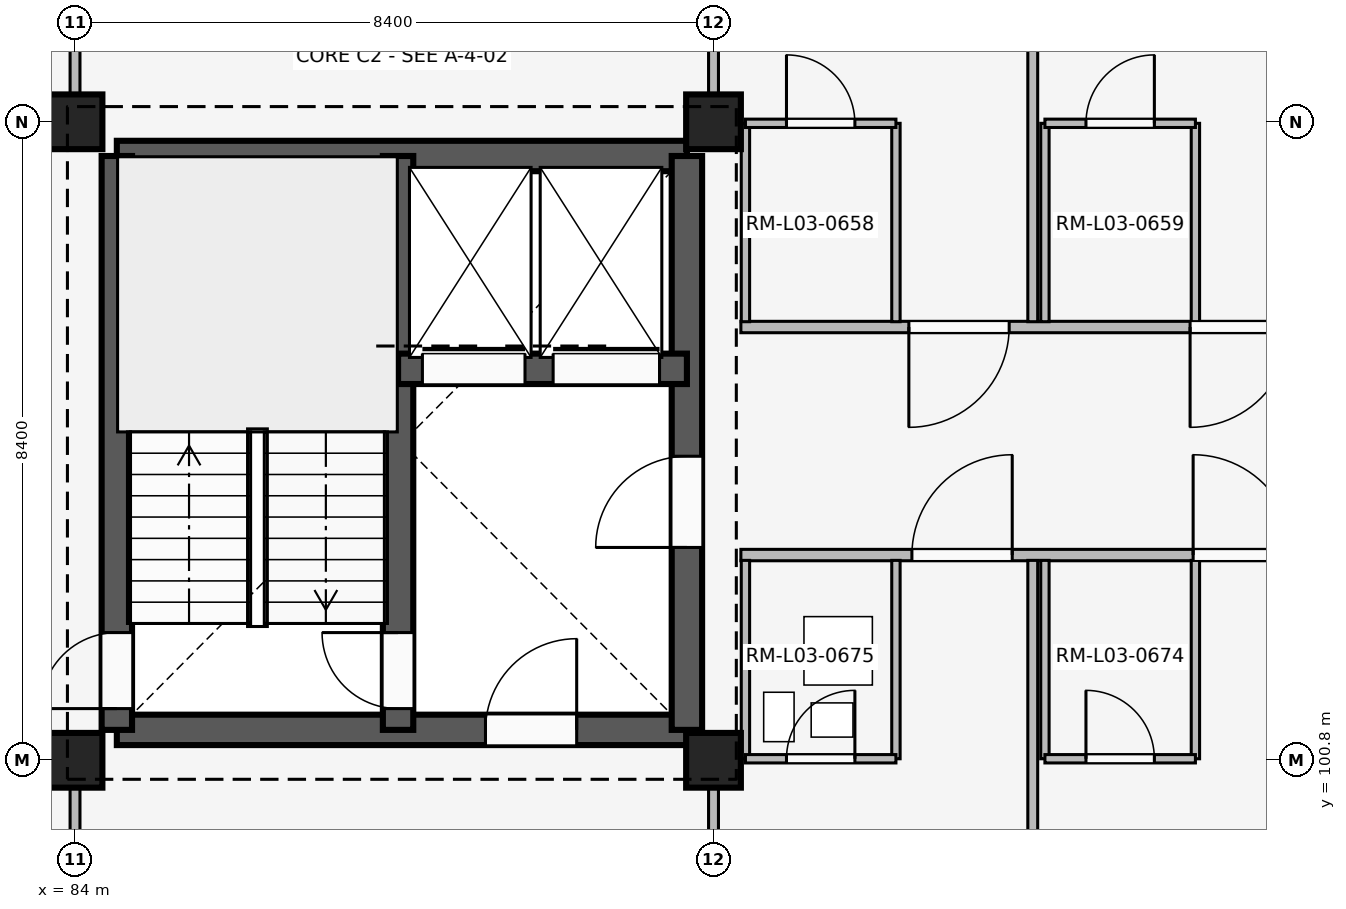
"""IFC4 building model, lengths in metres.
Left out: names, types, materials, properties, quantities, classifications, styles, units other than length and angle.
Written with IfcOpenShell. Run it as: python <this file> out.ifc"""

import sys

from ifc_helpers import new_model, si_unit, direction, frame, frame_2d, origin, origin_2d, place, context, subcontext, project, spatial, rectangle, extrude, element, fill, save


model = new_model("IFC4")
c1 = context("Model", 3, precision=1e-05, world=origin(), true_north=direction((0.0, 1.0)))
c2 = subcontext(c1, "Body", "Model", "MODEL_VIEW")
j1 = project(units=[si_unit("LENGTHUNIT", "METRE"), si_unit("PLANEANGLEUNIT", "RADIAN")], contexts=[c1])
p1 = place(None, origin())
s1 = spatial("IfcSite", under=j1, at=p1, CompositionType="ELEMENT")
p2 = place(p1, origin())
s2 = spatial("IfcBuilding", under=s1, at=p2, CompositionType="ELEMENT")
p3 = place(p2, frame((0.0, 0.0, 12.9)))
s3 = spatial("IfcBuildingStorey", under=s2, at=p3, CompositionType="ELEMENT", Elevation=12.9)
for number, where, z_axis, x_axis in (
    (1, (84.0, 100.8, 0.0), (0.0, 0.0, 1.0), (1.0, 0.0, 0.0)),
    (2, (84.0, 109.2, 0.0), (0.0, 0.0, 1.0), (1.0, 0.0, 0.0)),
    (3, (92.4, 100.8, 0.0), (0.0, 0.0, 1.0), (1.0, 0.0, 0.0)),
    (4, (92.4, 109.2, 0.0), (0.0, 0.0, 1.0), (1.0, 0.0, 0.0)),
):
    element("IfcColumn", number, at=place(p3, frame(where, z_axis=z_axis, x_axis=x_axis)), inside=s3, PredefinedType="COLUMN", context=c2, shape_type="SweptSolid", body=[
        extrude(rectangle(XDim=0.72, YDim=0.72, at=origin_2d()), origin(), (0.0, 0.0, 1.0), 3.3),
    ])
p4 = place(p3, frame((84.55, 101.2, 0.0), z_axis=(0.0, 0.0, 1.0), x_axis=(1.0, 0.0, 0.0)))
e5 = element("IfcWall", 5, at=p4, inside=s3, PredefinedType="SHEAR", context=c2, shape_type="SweptSolid", body=[
    extrude(rectangle(XDim=7.5, YDim=0.4, at=frame_2d((3.75, 0.0))), origin(), (0.0, 0.0, 1.0), 3.02),
])
p5 = place(p4, frame((4.85, 0.0, 0.0)))
e6 = element("IfcOpeningElement", 6, at=p5, cuts=e5, PredefinedType="OPENING", context=c2, shape_type="SweptSolid", body=[
    extrude(rectangle(XDim=1.2, YDim=2.2, at=frame_2d((0.6, 1.1))), frame((0.0, 0.21, 0.0), z_axis=(0.0, -1.0, 0.0), x_axis=(1.0, 0.0, 0.0)), (0.0, 0.0, 1.0), 0.42),
])
p6 = place(p3, frame((84.55, 108.75, 0.0), z_axis=(0.0, 0.0, 1.0), x_axis=(1.0, 0.0, 0.0)))
e7 = element("IfcWall", 7, at=p6, inside=s3, PredefinedType="SHEAR", context=c2, shape_type="SweptSolid", body=[
    extrude(rectangle(XDim=7.5, YDim=0.4, at=frame_2d((3.75, 0.0))), origin(), (0.0, 0.0, 1.0), 3.02),
])
p7 = place(p3, frame((84.55, 101.2, 0.0), z_axis=(0.0, 0.0, 1.0), x_axis=(0.0, 1.0, 0.0)))
e8 = element("IfcWall", 8, at=p7, inside=s3, PredefinedType="SHEAR", context=c2, shape_type="SweptSolid", body=[
    extrude(rectangle(XDim=7.55, YDim=0.4, at=frame_2d((3.775, 0.0))), origin(), (0.0, 0.0, 1.0), 3.02),
])
p8 = place(p7, frame((0.28, 0.0, 0.0)))
e9 = element("IfcOpeningElement", 9, at=p8, cuts=e8, PredefinedType="OPENING", context=c2, shape_type="SweptSolid", body=[
    extrude(rectangle(XDim=1.0, YDim=2.15, at=frame_2d((0.5, 1.075))), frame((0.0, 0.21, 0.0), z_axis=(0.0, -1.0, 0.0), x_axis=(1.0, 0.0, 0.0)), (0.0, 0.0, 1.0), 0.42),
])
p9 = place(p3, frame((92.05, 101.2, 0.0), z_axis=(0.0, 0.0, 1.0), x_axis=(0.0, 1.0, 0.0)))
e10 = element("IfcWall", 10, at=p9, inside=s3, PredefinedType="SHEAR", context=c2, shape_type="SweptSolid", body=[
    extrude(rectangle(XDim=7.55, YDim=0.4, at=frame_2d((3.775, 0.0))), origin(), (0.0, 0.0, 1.0), 3.02),
])
p10 = place(p9, frame((2.4, 0.0, 0.0)))
e11 = element("IfcOpeningElement", 11, at=p10, cuts=e10, PredefinedType="OPENING", context=c2, shape_type="SweptSolid", body=[
    extrude(rectangle(XDim=1.2, YDim=2.2, at=frame_2d((0.6, 1.1))), frame((0.0, 0.21, 0.0), z_axis=(0.0, -1.0, 0.0), x_axis=(1.0, 0.0, 0.0)), (0.0, 0.0, 1.0), 0.42),
])
p11 = place(p3, frame((88.25, 101.2, 0.0), z_axis=(0.0, 0.0, 1.0), x_axis=(0.0, 1.0, 0.0)))
e12 = element("IfcWall", 12, at=p11, inside=s3, PredefinedType="SHEAR", context=c2, shape_type="SweptSolid", body=[
    extrude(rectangle(XDim=7.55, YDim=0.4, at=frame_2d((3.775, 0.0))), origin(), (0.0, 0.0, 1.0), 3.02),
])
p12 = place(p11, frame((0.28, 0.0, 0.0)))
e13 = element("IfcOpeningElement", 13, at=p12, cuts=e12, PredefinedType="OPENING", context=c2, shape_type="SweptSolid", body=[
    extrude(rectangle(XDim=1.0, YDim=2.15, at=frame_2d((0.5, 1.075))), frame((0.0, 0.21, 0.0), z_axis=(0.0, -1.0, 0.0), x_axis=(1.0, 0.0, 0.0)), (0.0, 0.0, 1.0), 0.42),
])
p13 = place(p3, frame((88.25, 105.95, 0.0), z_axis=(0.0, 0.0, 1.0), x_axis=(1.0, 0.0, 0.0)))
e14 = element("IfcWall", 14, at=p13, inside=s3, PredefinedType="SHEAR", context=c2, shape_type="SweptSolid", body=[
    extrude(rectangle(XDim=3.8, YDim=0.4, at=frame_2d((1.9, 0.0))), origin(), (0.0, 0.0, 1.0), 3.02),
])
p14 = place(p13, frame((0.32, 0.0, 0.0)))
e15 = element("IfcOpeningElement", 15, at=p14, cuts=e14, PredefinedType="OPENING", context=c2, shape_type="SweptSolid", body=[
    extrude(rectangle(XDim=1.35, YDim=2.25, at=frame_2d((0.675, 1.125))), frame((0.0, 0.21, 0.0), z_axis=(0.0, -1.0, 0.0), x_axis=(1.0, 0.0, 0.0)), (0.0, 0.0, 1.0), 0.42),
])
p15 = place(p13, frame((2.04, 0.0, 0.0)))
e16 = element("IfcOpeningElement", 16, at=p15, cuts=e14, PredefinedType="OPENING", context=c2, shape_type="SweptSolid", body=[
    extrude(rectangle(XDim=1.4, YDim=2.25, at=frame_2d((0.7, 1.125))), frame((0.0, 0.21, 0.0), z_axis=(0.0, -1.0, 0.0), x_axis=(1.0, 0.0, 0.0)), (0.0, 0.0, 1.0), 0.42),
])
p16 = place(p3, frame((84.0, 92.54, 0.0), z_axis=(0.0, 0.0, 1.0), x_axis=(0.0, 1.0, 0.0)))
e17 = element("IfcWall", 17, at=p16, inside=s3, PredefinedType="PARTITIONING", context=c2, shape_type="SweptSolid", body=[
    extrude(rectangle(XDim=8.21, YDim=0.13, at=frame_2d((4.105, 0.0))), origin(), (0.0, 0.0, 1.0), 2.42),
])
p17 = place(p16, frame((3.64, 0.0, 0.0)))
e18 = element("IfcOpeningElement", 18, at=p17, cuts=e17, PredefinedType="OPENING", context=c2, shape_type="SweptSolid", body=[
    extrude(rectangle(XDim=1.08, YDim=2.15, at=frame_2d((0.54, 1.075))), frame((0.0, 0.075, 0.0), z_axis=(0.0, -1.0, 0.0), x_axis=(1.0, 0.0, 0.0)), (0.0, 0.0, 1.0), 0.15),
])
p18 = place(p3, frame((84.0, 109.55, 0.0), z_axis=(0.0, 0.0, 1.0), x_axis=(0.0, 1.0, 0.0)))
e19 = element("IfcWall", 19, at=p18, inside=s3, PredefinedType="PARTITIONING", context=c2, shape_type="SweptSolid", body=[
    extrude(rectangle(XDim=7.91, YDim=0.13, at=frame_2d((3.955, 0.0))), origin(), (0.0, 0.0, 1.0), 2.42),
])
p19 = place(p18, frame((3.4, 0.0, 0.0)))
e20 = element("IfcOpeningElement", 20, at=p19, cuts=e19, PredefinedType="OPENING", context=c2, shape_type="SweptSolid", body=[
    extrude(rectangle(XDim=1.05, YDim=2.2, at=frame_2d((0.525, 1.1))), frame((0.0, 0.075, 0.0), z_axis=(0.0, -1.0, 0.0), x_axis=(1.0, 0.0, 0.0)), (0.0, 0.0, 1.0), 0.15),
])
p20 = place(p3, frame((92.4, 92.54, 0.0), z_axis=(0.0, 0.0, 1.0), x_axis=(0.0, 1.0, 0.0)))
e21 = element("IfcWall", 21, at=p20, inside=s3, PredefinedType="PARTITIONING", context=c2, shape_type="SweptSolid", body=[
    extrude(rectangle(XDim=8.21, YDim=0.13, at=frame_2d((4.105, 0.0))), origin(), (0.0, 0.0, 1.0), 2.42),
])
p21 = place(p20, frame((3.64, 0.0, 0.0)))
e22 = element("IfcOpeningElement", 22, at=p21, cuts=e21, PredefinedType="OPENING", context=c2, shape_type="SweptSolid", body=[
    extrude(rectangle(XDim=1.08, YDim=2.15, at=frame_2d((0.54, 1.075))), frame((0.0, 0.075, 0.0), z_axis=(0.0, -1.0, 0.0), x_axis=(1.0, 0.0, 0.0)), (0.0, 0.0, 1.0), 0.15),
])
p22 = place(p3, frame((92.4, 109.55, 0.0), z_axis=(0.0, 0.0, 1.0), x_axis=(0.0, 1.0, 0.0)))
e23 = element("IfcWall", 23, at=p22, inside=s3, PredefinedType="PARTITIONING", context=c2, shape_type="SweptSolid", body=[
    extrude(rectangle(XDim=7.91, YDim=0.13, at=frame_2d((3.955, 0.0))), origin(), (0.0, 0.0, 1.0), 2.42),
])
p23 = place(p22, frame((3.4, 0.0, 0.0)))
e24 = element("IfcOpeningElement", 24, at=p23, cuts=e23, PredefinedType="OPENING", context=c2, shape_type="SweptSolid", body=[
    extrude(rectangle(XDim=1.05, YDim=2.2, at=frame_2d((0.525, 1.1))), frame((0.0, 0.075, 0.0), z_axis=(0.0, -1.0, 0.0), x_axis=(1.0, 0.0, 0.0)), (0.0, 0.0, 1.0), 0.15),
])
p24 = place(p3, frame((92.76, 103.5, 0.0), z_axis=(0.0, 0.0, 1.0), x_axis=(1.0, 0.0, 0.0)))
e25 = element("IfcWall", 25, at=p24, inside=s3, PredefinedType="PARTITIONING", context=c2, shape_type="SweptSolid", body=[
    extrude(rectangle(XDim=7.96, YDim=0.15, at=frame_2d((3.98, 0.0))), origin(), (0.0, 0.0, 1.0), 2.42),
])
p25 = place(p24, frame((2.25, 0.0, 0.0)))
e26 = element("IfcOpeningElement", 26, at=p25, cuts=e25, PredefinedType="OPENING", context=c2, shape_type="SweptSolid", body=[
    extrude(rectangle(XDim=1.32, YDim=2.25, at=frame_2d((0.66, 1.125))), frame((0.0, 0.085, 0.0), z_axis=(0.0, -1.0, 0.0), x_axis=(1.0, 0.0, 0.0)), (0.0, 0.0, 1.0), 0.17),
])
p26 = place(p24, frame((5.95, 0.0, 0.0)))
e27 = element("IfcOpeningElement", 27, at=p26, cuts=e25, PredefinedType="OPENING", context=c2, shape_type="SweptSolid", body=[
    extrude(rectangle(XDim=1.32, YDim=2.25, at=frame_2d((0.66, 1.125))), frame((0.0, 0.085, 0.0), z_axis=(0.0, -1.0, 0.0), x_axis=(1.0, 0.0, 0.0)), (0.0, 0.0, 1.0), 0.17),
])
p27 = place(p3, frame((96.6, 92.5, 0.0), z_axis=(0.0, 0.0, 1.0), x_axis=(0.0, 1.0, 0.0)))
e28 = element("IfcWall", 28, at=p27, inside=s3, PredefinedType="PARTITIONING", context=c2, shape_type="SweptSolid", body=[
    extrude(rectangle(XDim=10.93, YDim=0.13, at=frame_2d((5.465, 0.0))), origin(), (0.0, 0.0, 1.0), 2.42),
])
for number, where, z_axis, x_axis in (
    (29, (92.82, 100.82, 0.0), (0.0, 0.0, 1.0), (0.0, 1.0, 0.0)),
    (30, (94.8, 100.82, 0.0), (0.0, 0.0, 1.0), (0.0, 1.0, 0.0)),
):
    element("IfcWall", number, at=place(p3, frame(where, z_axis=z_axis, x_axis=x_axis)), inside=s3, PredefinedType="PARTITIONING", context=c2, shape_type="SweptSolid", body=[
        extrude(rectangle(XDim=2.61, YDim=0.11, at=frame_2d((1.305, 0.0))), origin(), (0.0, 0.0, 1.0), 2.42),
    ])
p28 = place(p3, frame((92.82, 100.82, 0.0), z_axis=(0.0, 0.0, 1.0), x_axis=(1.0, 0.0, 0.0)))
e31 = element("IfcWall", 31, at=p28, inside=s3, PredefinedType="PARTITIONING", context=c2, shape_type="SweptSolid", body=[
    extrude(rectangle(XDim=1.98, YDim=0.11, at=frame_2d((0.99, 0.0))), origin(), (0.0, 0.0, 1.0), 2.42),
])
p29 = place(p28, frame((0.54, 0.0, 0.0)))
e32 = element("IfcOpeningElement", 32, at=p29, cuts=e31, PredefinedType="OPENING", context=c2, shape_type="SweptSolid", body=[
    extrude(rectangle(XDim=0.9, YDim=2.1, at=frame_2d((0.45, 1.05))), frame((0.0, 0.065, 0.0), z_axis=(0.0, -1.0, 0.0), x_axis=(1.0, 0.0, 0.0)), (0.0, 0.0, 1.0), 0.13),
])
for number, where, z_axis, x_axis in (
    (33, (96.76, 100.82, 0.0), (0.0, 0.0, 1.0), (0.0, 1.0, 0.0)),
    (34, (98.74, 100.82, 0.0), (0.0, 0.0, 1.0), (0.0, 1.0, 0.0)),
):
    element("IfcWall", number, at=place(p3, frame(where, z_axis=z_axis, x_axis=x_axis)), inside=s3, PredefinedType="PARTITIONING", context=c2, shape_type="SweptSolid", body=[
        extrude(rectangle(XDim=2.61, YDim=0.11, at=frame_2d((1.305, 0.0))), origin(), (0.0, 0.0, 1.0), 2.42),
    ])
p30 = place(p3, frame((96.76, 100.82, 0.0), z_axis=(0.0, 0.0, 1.0), x_axis=(1.0, 0.0, 0.0)))
e35 = element("IfcWall", 35, at=p30, inside=s3, PredefinedType="PARTITIONING", context=c2, shape_type="SweptSolid", body=[
    extrude(rectangle(XDim=1.98, YDim=0.11, at=frame_2d((0.99, 0.0))), origin(), (0.0, 0.0, 1.0), 2.42),
])
p31 = place(p30, frame((0.54, 0.0, 0.0)))
e36 = element("IfcOpeningElement", 36, at=p31, cuts=e35, PredefinedType="OPENING", context=c2, shape_type="SweptSolid", body=[
    extrude(rectangle(XDim=0.9, YDim=2.1, at=frame_2d((0.45, 1.05))), frame((0.0, 0.065, 0.0), z_axis=(0.0, -1.0, 0.0), x_axis=(1.0, 0.0, 0.0)), (0.0, 0.0, 1.0), 0.13),
])
p32 = place(p3, frame((100.72, 106.5, 0.0), z_axis=(0.0, 0.0, 1.0), x_axis=(-1.0, 0.0, 0.0)))
e37 = element("IfcWall", 37, at=p32, inside=s3, PredefinedType="PARTITIONING", context=c2, shape_type="SweptSolid", body=[
    extrude(rectangle(XDim=7.96, YDim=0.15, at=frame_2d((3.98, 0.0))), origin(), (0.0, 0.0, 1.0), 2.42),
])
p33 = place(p32, frame((0.73, 0.0, 0.0)))
e38 = element("IfcOpeningElement", 38, at=p33, cuts=e37, PredefinedType="OPENING", context=c2, shape_type="SweptSolid", body=[
    extrude(rectangle(XDim=1.32, YDim=2.25, at=frame_2d((0.66, 1.125))), frame((0.0, 0.085, 0.0), z_axis=(0.0, -1.0, 0.0), x_axis=(1.0, 0.0, 0.0)), (0.0, 0.0, 1.0), 0.17),
])
p34 = place(p32, frame((4.43, 0.0, 0.0)))
e39 = element("IfcOpeningElement", 39, at=p34, cuts=e37, PredefinedType="OPENING", context=c2, shape_type="SweptSolid", body=[
    extrude(rectangle(XDim=1.32, YDim=2.25, at=frame_2d((0.66, 1.125))), frame((0.0, 0.085, 0.0), z_axis=(0.0, -1.0, 0.0), x_axis=(1.0, 0.0, 0.0)), (0.0, 0.0, 1.0), 0.17),
])
p35 = place(p3, frame((96.6, 106.57, 0.0), z_axis=(0.0, 0.0, 1.0), x_axis=(0.0, 1.0, 0.0)))
e40 = element("IfcWall", 40, at=p35, inside=s3, PredefinedType="PARTITIONING", context=c2, shape_type="SweptSolid", body=[
    extrude(rectangle(XDim=10.93, YDim=0.13, at=frame_2d((5.465, 0.0))), origin(), (0.0, 0.0, 1.0), 2.42),
])
for number, where, z_axis, x_axis in (
    (41, (92.82, 106.57, 0.0), (0.0, 0.0, 1.0), (0.0, 1.0, 0.0)),
    (42, (94.8, 106.57, 0.0), (0.0, 0.0, 1.0), (0.0, 1.0, 0.0)),
):
    element("IfcWall", number, at=place(p3, frame(where, z_axis=z_axis, x_axis=x_axis)), inside=s3, PredefinedType="PARTITIONING", context=c2, shape_type="SweptSolid", body=[
        extrude(rectangle(XDim=2.61, YDim=0.11, at=frame_2d((1.305, 0.0))), origin(), (0.0, 0.0, 1.0), 2.42),
    ])
p36 = place(p3, frame((92.82, 109.18, 0.0), z_axis=(0.0, 0.0, 1.0), x_axis=(1.0, 0.0, 0.0)))
e43 = element("IfcWall", 43, at=p36, inside=s3, PredefinedType="PARTITIONING", context=c2, shape_type="SweptSolid", body=[
    extrude(rectangle(XDim=1.98, YDim=0.11, at=frame_2d((0.99, 0.0))), origin(), (0.0, 0.0, 1.0), 2.42),
])
p37 = place(p36, frame((0.54, 0.0, 0.0)))
e44 = element("IfcOpeningElement", 44, at=p37, cuts=e43, PredefinedType="OPENING", context=c2, shape_type="SweptSolid", body=[
    extrude(rectangle(XDim=0.9, YDim=2.1, at=frame_2d((0.45, 1.05))), frame((0.0, 0.065, 0.0), z_axis=(0.0, -1.0, 0.0), x_axis=(1.0, 0.0, 0.0)), (0.0, 0.0, 1.0), 0.13),
])
for number, where, z_axis, x_axis in (
    (45, (96.76, 106.57, 0.0), (0.0, 0.0, 1.0), (0.0, 1.0, 0.0)),
    (46, (98.74, 106.57, 0.0), (0.0, 0.0, 1.0), (0.0, 1.0, 0.0)),
):
    element("IfcWall", number, at=place(p3, frame(where, z_axis=z_axis, x_axis=x_axis)), inside=s3, PredefinedType="PARTITIONING", context=c2, shape_type="SweptSolid", body=[
        extrude(rectangle(XDim=2.61, YDim=0.11, at=frame_2d((1.305, 0.0))), origin(), (0.0, 0.0, 1.0), 2.42),
    ])
p38 = place(p3, frame((96.76, 109.18, 0.0), z_axis=(0.0, 0.0, 1.0), x_axis=(1.0, 0.0, 0.0)))
e47 = element("IfcWall", 47, at=p38, inside=s3, PredefinedType="PARTITIONING", context=c2, shape_type="SweptSolid", body=[
    extrude(rectangle(XDim=1.98, YDim=0.11, at=frame_2d((0.99, 0.0))), origin(), (0.0, 0.0, 1.0), 2.42),
])
p39 = place(p38, frame((0.54, 0.0, 0.0)))
e48 = element("IfcOpeningElement", 48, at=p39, cuts=e47, PredefinedType="OPENING", context=c2, shape_type="SweptSolid", body=[
    extrude(rectangle(XDim=0.9, YDim=2.1, at=frame_2d((0.45, 1.05))), frame((0.0, 0.065, 0.0), z_axis=(0.0, -1.0, 0.0), x_axis=(1.0, 0.0, 0.0)), (0.0, 0.0, 1.0), 0.13),
])
p40 = place(p10, origin())
e49 = element("IfcDoor", 49, at=p40, inside=s3, OperationType="SINGLE_SWING_LEFT", PredefinedType="DOOR", context=c2, shape_type="SweptSolid", body=[
    extrude(rectangle(XDim=1.2, YDim=2.2, at=frame_2d((0.6, 1.1))), frame((0.0, 0.025, 0.0), z_axis=(0.0, -1.0, 0.0), x_axis=(1.0, 0.0, 0.0)), (0.0, 0.0, 1.0), 0.05),
])
fill(e11, e49)
p41 = place(p5, origin())
e50 = element("IfcDoor", 50, at=p41, inside=s3, OperationType="SINGLE_SWING_RIGHT", PredefinedType="DOOR", context=c2, shape_type="SweptSolid", body=[
    extrude(rectangle(XDim=1.2, YDim=2.2, at=frame_2d((0.6, 1.1))), frame((0.0, 0.025, 0.0), z_axis=(0.0, -1.0, 0.0), x_axis=(1.0, 0.0, 0.0)), (0.0, 0.0, 1.0), 0.05),
])
fill(e6, e50)
p42 = place(p8, origin())
e51 = element("IfcDoor", 51, at=p42, inside=s3, OperationType="SINGLE_SWING_LEFT", PredefinedType="DOOR", context=c2, shape_type="SweptSolid", body=[
    extrude(rectangle(XDim=1.0, YDim=2.15, at=frame_2d((0.5, 1.075))), frame((0.0, 0.025, 0.0), z_axis=(0.0, -1.0, 0.0), x_axis=(1.0, 0.0, 0.0)), (0.0, 0.0, 1.0), 0.05),
])
fill(e9, e51)
p43 = place(p12, origin())
e52 = element("IfcDoor", 52, at=p43, inside=s3, OperationType="SINGLE_SWING_RIGHT", PredefinedType="DOOR", context=c2, shape_type="SweptSolid", body=[
    extrude(rectangle(XDim=1.0, YDim=2.15, at=frame_2d((0.5, 1.075))), frame((0.0, 0.025, 0.0), z_axis=(0.0, -1.0, 0.0), x_axis=(1.0, 0.0, 0.0)), (0.0, 0.0, 1.0), 0.05),
])
fill(e13, e52)
p44 = place(p14, origin())
e53 = element("IfcDoor", 53, at=p44, inside=s3, OperationType="SLIDING_TO_LEFT", PredefinedType="DOOR", context=c2, shape_type="SweptSolid", body=[
    extrude(rectangle(XDim=1.35, YDim=2.25, at=frame_2d((0.675, 1.125))), frame((0.0, 0.025, 0.0), z_axis=(0.0, -1.0, 0.0), x_axis=(1.0, 0.0, 0.0)), (0.0, 0.0, 1.0), 0.05),
])
fill(e15, e53)
p45 = place(p15, origin())
e54 = element("IfcDoor", 54, at=p45, inside=s3, OperationType="SLIDING_TO_LEFT", PredefinedType="DOOR", context=c2, shape_type="SweptSolid", body=[
    extrude(rectangle(XDim=1.4, YDim=2.25, at=frame_2d((0.7, 1.125))), frame((0.0, 0.025, 0.0), z_axis=(0.0, -1.0, 0.0), x_axis=(1.0, 0.0, 0.0)), (0.0, 0.0, 1.0), 0.05),
])
fill(e16, e54)
p46 = place(p25, origin())
e55 = element("IfcDoor", 55, at=p46, inside=s3, OperationType="SINGLE_SWING_RIGHT", PredefinedType="DOOR", context=c2, shape_type="SweptSolid", body=[
    extrude(rectangle(XDim=1.32, YDim=2.25, at=frame_2d((0.66, 1.125))), frame((0.0, 0.025, 0.0), z_axis=(0.0, -1.0, 0.0), x_axis=(1.0, 0.0, 0.0)), (0.0, 0.0, 1.0), 0.05),
])
fill(e26, e55)
p47 = place(p26, origin())
e56 = element("IfcDoor", 56, at=p47, inside=s3, OperationType="SINGLE_SWING_LEFT", PredefinedType="DOOR", context=c2, shape_type="SweptSolid", body=[
    extrude(rectangle(XDim=1.32, YDim=2.25, at=frame_2d((0.66, 1.125))), frame((0.0, 0.025, 0.0), z_axis=(0.0, -1.0, 0.0), x_axis=(1.0, 0.0, 0.0)), (0.0, 0.0, 1.0), 0.05),
])
fill(e27, e56)
p48 = place(p29, origin())
e57 = element("IfcDoor", 57, at=p48, inside=s3, OperationType="SINGLE_SWING_RIGHT", PredefinedType="DOOR", context=c2, shape_type="SweptSolid", body=[
    extrude(rectangle(XDim=0.9, YDim=2.1, at=frame_2d((0.45, 1.05))), frame((0.0, 0.025, 0.0), z_axis=(0.0, -1.0, 0.0), x_axis=(1.0, 0.0, 0.0)), (0.0, 0.0, 1.0), 0.05),
])
fill(e32, e57)
p49 = place(p31, origin())
e58 = element("IfcDoor", 58, at=p49, inside=s3, OperationType="SINGLE_SWING_LEFT", PredefinedType="DOOR", context=c2, shape_type="SweptSolid", body=[
    extrude(rectangle(XDim=0.9, YDim=2.1, at=frame_2d((0.45, 1.05))), frame((0.0, 0.025, 0.0), z_axis=(0.0, -1.0, 0.0), x_axis=(1.0, 0.0, 0.0)), (0.0, 0.0, 1.0), 0.05),
])
fill(e36, e58)
p50 = place(p33, origin())
e59 = element("IfcDoor", 59, at=p50, inside=s3, OperationType="SINGLE_SWING_RIGHT", PredefinedType="DOOR", context=c2, shape_type="SweptSolid", body=[
    extrude(rectangle(XDim=1.32, YDim=2.25, at=frame_2d((0.66, 1.125))), frame((0.0, 0.025, 0.0), z_axis=(0.0, -1.0, 0.0), x_axis=(1.0, 0.0, 0.0)), (0.0, 0.0, 1.0), 0.05),
])
fill(e38, e59)
p51 = place(p34, origin())
e60 = element("IfcDoor", 60, at=p51, inside=s3, OperationType="SINGLE_SWING_RIGHT", PredefinedType="DOOR", context=c2, shape_type="SweptSolid", body=[
    extrude(rectangle(XDim=1.32, YDim=2.25, at=frame_2d((0.66, 1.125))), frame((0.0, 0.025, 0.0), z_axis=(0.0, -1.0, 0.0), x_axis=(1.0, 0.0, 0.0)), (0.0, 0.0, 1.0), 0.05),
])
fill(e39, e60)
p52 = place(p37, origin())
e61 = element("IfcDoor", 61, at=p52, inside=s3, OperationType="SINGLE_SWING_LEFT", PredefinedType="DOOR", context=c2, shape_type="SweptSolid", body=[
    extrude(rectangle(XDim=0.9, YDim=2.1, at=frame_2d((0.45, 1.05))), frame((0.0, 0.025, 0.0), z_axis=(0.0, -1.0, 0.0), x_axis=(1.0, 0.0, 0.0)), (0.0, 0.0, 1.0), 0.05),
])
fill(e44, e61)
p53 = place(p39, origin())
e62 = element("IfcDoor", 62, at=p53, inside=s3, OperationType="SINGLE_SWING_RIGHT", PredefinedType="DOOR", context=c2, shape_type="SweptSolid", body=[
    extrude(rectangle(XDim=0.9, YDim=2.1, at=frame_2d((0.45, 1.05))), frame((0.0, 0.025, 0.0), z_axis=(0.0, -1.0, 0.0), x_axis=(1.0, 0.0, 0.0)), (0.0, 0.0, 1.0), 0.05),
])
fill(e48, e62)
save(model, sys.argv[1])
